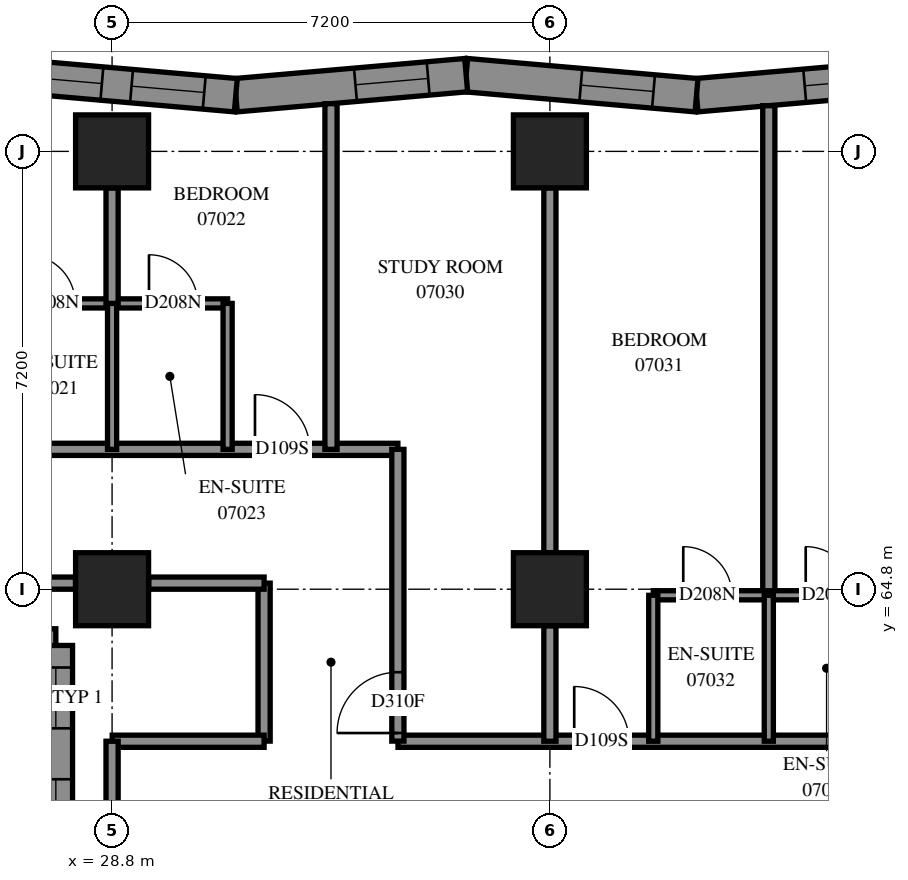
"""IFC4 building model, lengths in metres.
Left out: names, types, materials, properties, quantities, classifications, styles, units other than length and angle.
Written with IfcOpenShell. Run it as: python <this file> out.ifc"""

import sys

from ifc_helpers import new_model, si_unit, direction, frame, frame_2d, origin, origin_2d, place, context, subcontext, project, spatial, polyline, rectangle, outline, extrude, element, fill, save


model = new_model("IFC4")
c1 = context("Model", 3, precision=1e-05, world=origin(), true_north=direction((0.0, 1.0)))
c2 = subcontext(c1, "Body", "Model", "MODEL_VIEW")
j1 = project(units=[si_unit("LENGTHUNIT", "METRE"), si_unit("PLANEANGLEUNIT", "RADIAN")], contexts=[c1])
p1 = place(None, origin())
s1 = spatial("IfcSite", under=j1, at=p1, CompositionType="ELEMENT")
p2 = place(p1, origin())
s2 = spatial("IfcBuilding", under=s1, at=p2, CompositionType="ELEMENT")
p3 = place(p2, frame((0.0, 0.0, 30.4)))
s3 = spatial("IfcBuildingStorey", under=s2, at=p3, CompositionType="ELEMENT", Elevation=30.4)
for number, where, z_axis, x_axis in (
    (1, (28.8, 64.8, 0.0), (0.0, 0.0, 1.0), (1.0, 0.0, 0.0)),
    (2, (28.8, 72.0, 0.0), (0.0, 0.0, 1.0), (1.0, 0.0, 0.0)),
    (3, (36.0, 64.8, 0.0), (0.0, 0.0, 1.0), (1.0, 0.0, 0.0)),
    (4, (36.0, 72.0, 0.0), (0.0, 0.0, 1.0), (1.0, 0.0, 0.0)),
):
    element("IfcColumn", number, at=place(p3, frame(where, z_axis=z_axis, x_axis=x_axis)), inside=s3, PredefinedType="COLUMN", context=c2, shape_type="SweptSolid", body=[
        extrude(rectangle(XDim=1.2, YDim=1.2, at=origin_2d()), origin(), (0.0, 0.0, 1.0), 3.1),
    ])
p4 = place(p3, frame((42.2, 73.254, 0.0), z_axis=(0.0, 0.0, 1.0), x_axis=(-0.9962273538, -0.0867816769, 0.0)))
e5 = element("IfcWall", 5, at=p4, inside=s3, PredefinedType="SOLIDWALL", context=c2, shape_type="SweptSolid", body=[
    extrude(outline(polyline([(-0.024, -0.275), (3.779, -0.275), (3.827, 0.275), (0.024, 0.275), (-0.024, -0.275)])), origin(), (0.0, 0.0, 1.0), 3.1),
])
p5 = place(p4, frame((0.817, 0.0, 0.5)))
e6 = element("IfcOpeningElement", 6, at=p5, cuts=e5, PredefinedType="OPENING", context=c2, shape_type="SweptSolid", body=[
    extrude(rectangle(XDim=1.2, YDim=2.45, at=frame_2d((0.6, 1.225))), frame((0.0, 0.285, 0.0), z_axis=(0.0, -1.0, 0.0), x_axis=(1.0, 0.0, 0.0)), (0.0, 0.0, 1.0), 0.57),
])
p6 = place(p3, frame((38.411, 72.924, 0.0), z_axis=(0.0, 0.0, 1.0), x_axis=(-0.9962271558, 0.0867839505, 0.0)))
e7 = element("IfcWall", 7, at=p6, inside=s3, PredefinedType="SOLIDWALL", context=c2, shape_type="SweptSolid", body=[
    extrude(outline(polyline([(0.024, -0.275), (3.827, -0.275), (3.779, 0.275), (-0.024, 0.275), (0.024, -0.275)])), origin(), (0.0, 0.0, 1.0), 3.1),
])
p7 = place(p6, frame((0.71, 0.0, 0.5)))
e8 = element("IfcOpeningElement", 8, at=p7, cuts=e7, PredefinedType="OPENING", context=c2, shape_type="SweptSolid", body=[
    extrude(rectangle(XDim=1.2, YDim=2.45, at=frame_2d((0.6, 1.225))), frame((0.0, 0.285, 0.0), z_axis=(0.0, -1.0, 0.0), x_axis=(1.0, 0.0, 0.0)), (0.0, 0.0, 1.0), 0.57),
])
p8 = place(p3, frame((34.623, 73.254, 0.0), z_axis=(0.0, 0.0, 1.0), x_axis=(-0.9962273538, -0.0867816769, 0.0)))
e9 = element("IfcWall", 9, at=p8, inside=s3, PredefinedType="SOLIDWALL", context=c2, shape_type="SweptSolid", body=[
    extrude(outline(polyline([(-0.024, -0.275), (3.779, -0.275), (3.827, 0.275), (0.024, 0.275), (-0.024, -0.275)])), origin(), (0.0, 0.0, 1.0), 3.1),
])
p9 = place(p8, frame((0.628, 0.0, 0.5)))
e10 = element("IfcOpeningElement", 10, at=p9, cuts=e9, PredefinedType="OPENING", context=c2, shape_type="SweptSolid", body=[
    extrude(rectangle(XDim=1.2, YDim=2.45, at=frame_2d((0.6, 1.225))), frame((0.0, 0.285, 0.0), z_axis=(0.0, -1.0, 0.0), x_axis=(1.0, 0.0, 0.0)), (0.0, 0.0, 1.0), 0.57),
])
p10 = place(p3, frame((30.835, 72.924, 0.0), z_axis=(0.0, 0.0, 1.0), x_axis=(-0.9962273538, 0.0867816769, 0.0)))
e11 = element("IfcWall", 11, at=p10, inside=s3, PredefinedType="SOLIDWALL", context=c2, shape_type="SweptSolid", body=[
    extrude(outline(polyline([(0.024, -0.275), (3.827, -0.275), (3.779, 0.275), (-0.024, 0.275), (0.024, -0.275)])), origin(), (0.0, 0.0, 1.0), 3.1),
])
p11 = place(p10, frame((0.521, 0.0, 0.5)))
e12 = element("IfcOpeningElement", 12, at=p11, cuts=e11, PredefinedType="OPENING", context=c2, shape_type="SweptSolid", body=[
    extrude(rectangle(XDim=1.2, YDim=2.45, at=frame_2d((0.6, 1.225))), frame((0.0, 0.285, 0.0), z_axis=(0.0, -1.0, 0.0), x_axis=(1.0, 0.0, 0.0)), (0.0, 0.0, 1.0), 0.57),
])
p12 = place(p10, frame((2.211, 0.0, 0.5)))
e13 = element("IfcOpeningElement", 13, at=p12, cuts=e11, PredefinedType="OPENING", context=c2, shape_type="SweptSolid", body=[
    extrude(rectangle(XDim=1.2, YDim=2.45, at=frame_2d((0.6, 1.225))), frame((0.0, 0.285, 0.0), z_axis=(0.0, -1.0, 0.0), x_axis=(1.0, 0.0, 0.0)), (0.0, 0.0, 1.0), 0.57),
])
p13 = place(p3, frame((19.745, 63.875, 0.0), z_axis=(0.0, 0.0, 1.0), x_axis=(1.0, 0.0, 0.0)))
e14 = element("IfcWall", 14, at=p13, inside=s3, PredefinedType="SOLIDWALL", context=c2, shape_type="SweptSolid", body=[
    extrude(outline(polyline([(-0.275, -0.275), (7.855, -0.275), (8.405, 0.275), (0.275, 0.275), (-0.275, -0.275)])), origin(), (0.0, 0.0, 1.0), 3.1),
])
p14 = place(p13, frame((2.255, 0.0, 0.5)))
e15 = element("IfcOpeningElement", 15, at=p14, cuts=e14, PredefinedType="OPENING", context=c2, shape_type="SweptSolid", body=[
    extrude(rectangle(XDim=2.8, YDim=2.45, at=frame_2d((1.4, 1.225))), frame((0.0, 0.285, 0.0), z_axis=(0.0, -1.0, 0.0), x_axis=(1.0, 0.0, 0.0)), (0.0, 0.0, 1.0), 0.57),
])
p15 = place(p13, frame((6.093, 0.0, 0.5)))
e16 = element("IfcOpeningElement", 16, at=p15, cuts=e14, PredefinedType="OPENING", context=c2, shape_type="SweptSolid", body=[
    extrude(rectangle(XDim=1.2, YDim=2.45, at=frame_2d((0.6, 1.225))), frame((0.0, 0.285, 0.0), z_axis=(0.0, -1.0, 0.0), x_axis=(1.0, 0.0, 0.0)), (0.0, 0.0, 1.0), 0.57),
])
p16 = place(p3, frame((27.875, 63.875, 0.0), z_axis=(0.0, 0.0, 1.0), x_axis=(0.0, -1.0, 0.0)))
e17 = element("IfcWall", 17, at=p16, inside=s3, PredefinedType="SOLIDWALL", context=c2, shape_type="SweptSolid", body=[
    extrude(outline(polyline([(0.275, -0.275), (7.475, -0.275), (6.925, 0.275), (-0.275, 0.275), (0.275, -0.275)])), origin(), (0.0, 0.0, 1.0), 3.1),
])
p17 = place(p16, frame((3.975, 0.0, 0.7)))
e18 = element("IfcOpeningElement", 18, at=p17, cuts=e17, PredefinedType="OPENING", context=c2, shape_type="SweptSolid", body=[
    extrude(rectangle(XDim=1.8, YDim=2.2, at=frame_2d((0.9, 1.1))), frame((0.0, 0.285, 0.0), z_axis=(0.0, -1.0, 0.0), x_axis=(1.0, 0.0, 0.0)), (0.0, 0.0, 1.0), 0.57),
])
p18 = place(p16, frame((0.362, 0.0, 0.45)))
e19 = element("IfcOpeningElement", 19, at=p18, cuts=e17, PredefinedType="OPENING", context=c2, shape_type="SweptSolid", body=[
    extrude(rectangle(XDim=1.0, YDim=2.5, at=frame_2d((0.5, 1.25))), frame((0.0, 0.285, 0.0), z_axis=(0.0, -1.0, 0.0), x_axis=(1.0, 0.0, 0.0)), (0.0, 0.0, 1.0), 0.57),
])
p19 = place(p16, frame((2.2, 0.0, 0.5)))
e20 = element("IfcOpeningElement", 20, at=p19, cuts=e17, PredefinedType="OPENING", context=c2, shape_type="SweptSolid", body=[
    extrude(rectangle(XDim=1.2, YDim=2.45, at=frame_2d((0.6, 1.225))), frame((0.0, 0.285, 0.0), z_axis=(0.0, -1.0, 0.0), x_axis=(1.0, 0.0, 0.0)), (0.0, 0.0, 1.0), 0.57),
])
p20 = place(p3, frame((33.502, 62.3, 0.0), z_axis=(0.0, 0.0, 1.0), x_axis=(1.0, 0.0, 0.0)))
e21 = element("IfcWall", 21, at=p20, inside=s3, PredefinedType="PARTITIONING", context=c2, shape_type="SweptSolid", body=[
    extrude(rectangle(XDim=20.998, YDim=0.2, at=frame_2d((10.499, 0.0))), origin(), (0.0, 0.0, 1.0), 3.1),
])
p21 = place(p20, frame((2.898, 0.0, 0.0)))
e22 = element("IfcOpeningElement", 22, at=p21, cuts=e21, PredefinedType="OPENING", context=c2, shape_type="SweptSolid", body=[
    extrude(rectangle(XDim=0.9, YDim=2.1, at=frame_2d((0.45, 1.05))), frame((0.0, 0.11, 0.0), z_axis=(0.0, -1.0, 0.0), x_axis=(1.0, 0.0, 0.0)), (0.0, 0.0, 1.0), 0.22),
])
p22 = place(p20, frame((8.448, 0.0, 0.0)))
e23 = element("IfcOpeningElement", 23, at=p22, cuts=e21, PredefinedType="OPENING", context=c2, shape_type="SweptSolid", body=[
    extrude(rectangle(XDim=0.9, YDim=2.1, at=frame_2d((0.45, 1.05))), frame((0.0, 0.11, 0.0), z_axis=(0.0, -1.0, 0.0), x_axis=(1.0, 0.0, 0.0)), (0.0, 0.0, 1.0), 0.22),
])
p23 = place(p20, frame((10.098, 0.0, 0.0)))
e24 = element("IfcOpeningElement", 24, at=p23, cuts=e21, PredefinedType="OPENING", context=c2, shape_type="SweptSolid", body=[
    extrude(rectangle(XDim=0.9, YDim=2.1, at=frame_2d((0.45, 1.05))), frame((0.0, 0.11, 0.0), z_axis=(0.0, -1.0, 0.0), x_axis=(1.0, 0.0, 0.0)), (0.0, 0.0, 1.0), 0.22),
])
p24 = place(p20, frame((15.648, 0.0, 0.0)))
e25 = element("IfcOpeningElement", 25, at=p24, cuts=e21, PredefinedType="OPENING", context=c2, shape_type="SweptSolid", body=[
    extrude(rectangle(XDim=0.9, YDim=2.1, at=frame_2d((0.45, 1.05))), frame((0.0, 0.11, 0.0), z_axis=(0.0, -1.0, 0.0), x_axis=(1.0, 0.0, 0.0)), (0.0, 0.0, 1.0), 0.22),
])
p25 = place(p20, frame((17.298, 0.0, 0.0)))
e26 = element("IfcOpeningElement", 26, at=p25, cuts=e21, PredefinedType="OPENING", context=c2, shape_type="SweptSolid", body=[
    extrude(rectangle(XDim=0.9, YDim=2.1, at=frame_2d((0.45, 1.05))), frame((0.0, 0.11, 0.0), z_axis=(0.0, -1.0, 0.0), x_axis=(1.0, 0.0, 0.0)), (0.0, 0.0, 1.0), 0.22),
])
p26 = place(p3, frame((21.602, 67.1, 0.0), z_axis=(0.0, 0.0, 1.0), x_axis=(1.0, 0.0, 0.0)))
e27 = element("IfcWall", 27, at=p26, inside=s3, PredefinedType="PARTITIONING", context=c2, shape_type="SweptSolid", body=[
    extrude(rectangle(XDim=11.898, YDim=0.2, at=frame_2d((5.949, 0.0))), origin(), (0.0, 0.0, 1.0), 3.1),
])
p27 = place(p26, frame((1.798, 0.0, 0.0)))
e28 = element("IfcOpeningElement", 28, at=p27, cuts=e27, PredefinedType="OPENING", context=c2, shape_type="SweptSolid", body=[
    extrude(rectangle(XDim=1.0, YDim=2.1, at=frame_2d((0.5, 1.05))), frame((0.0, 0.11, 0.0), z_axis=(0.0, -1.0, 0.0), x_axis=(1.0, 0.0, 0.0)), (0.0, 0.0, 1.0), 0.22),
])
p28 = place(p26, frame((3.998, 0.0, 0.0)))
e29 = element("IfcOpeningElement", 29, at=p28, cuts=e27, PredefinedType="OPENING", context=c2, shape_type="SweptSolid", body=[
    extrude(rectangle(XDim=0.9, YDim=2.1, at=frame_2d((0.45, 1.05))), frame((0.0, 0.11, 0.0), z_axis=(0.0, -1.0, 0.0), x_axis=(1.0, 0.0, 0.0)), (0.0, 0.0, 1.0), 0.22),
])
p29 = place(p26, frame((9.548, 0.0, 0.0)))
e30 = element("IfcOpeningElement", 30, at=p29, cuts=e27, PredefinedType="OPENING", context=c2, shape_type="SweptSolid", body=[
    extrude(rectangle(XDim=0.9, YDim=2.1, at=frame_2d((0.45, 1.05))), frame((0.0, 0.11, 0.0), z_axis=(0.0, -1.0, 0.0), x_axis=(1.0, 0.0, 0.0)), (0.0, 0.0, 1.0), 0.22),
])
p30 = place(p3, frame((39.6, 64.7, 0.0), z_axis=(0.0, 0.0, 1.0), x_axis=(0.0, 1.0, 0.0)))
e31 = element("IfcWall", 31, at=p30, inside=s3, PredefinedType="PARTITIONING", context=c2, shape_type="SweptSolid", body=[
    extrude(rectangle(XDim=8.052, YDim=0.2, at=frame_2d((4.026, 0.0))), origin(), (0.0, 0.0, 1.0), 3.1),
])
p31 = place(p3, frame((22.2, 64.9, 0.0), z_axis=(0.0, 0.0, 1.0), x_axis=(1.0, 0.0, 0.0)))
e32 = element("IfcWall", 32, at=p31, inside=s3, PredefinedType="PARTITIONING", context=c2, shape_type="SweptSolid", body=[
    extrude(rectangle(XDim=6.0, YDim=0.2, at=frame_2d((3.0, 0.0))), origin(), (0.0, 0.0, 1.0), 2.6),
])
p32 = place(p3, frame((36.0, 65.4, 0.0), z_axis=(0.0, 0.0, 1.0), x_axis=(0.0, 1.0, 0.0)))
e33 = element("IfcWall", 33, at=p32, inside=s3, PredefinedType="PARTITIONING", context=c2, shape_type="SweptSolid", body=[
    extrude(rectangle(XDim=6.0, YDim=0.2, at=frame_2d((3.0, 0.0))), origin(), (0.0, 0.0, 1.0), 3.1),
])
p33 = place(p3, frame((32.4, 67.1, 0.0), z_axis=(0.0, 0.0, 1.0), x_axis=(0.0, 1.0, 0.0)))
e34 = element("IfcWall", 34, at=p33, inside=s3, PredefinedType="PARTITIONING", context=c2, shape_type="SweptSolid", body=[
    extrude(rectangle(XDim=5.684, YDim=0.2, at=frame_2d((2.842, 0.0))), origin(), (0.0, 0.0, 1.0), 3.1),
])
p34 = place(p3, frame((33.5, 62.302, 0.0), z_axis=(0.0, 0.0, 1.0), x_axis=(0.0, 1.0, 0.0)))
e35 = element("IfcWall", 35, at=p34, inside=s3, PredefinedType="PARTITIONING", context=c2, shape_type="SweptSolid", body=[
    extrude(rectangle(XDim=4.798, YDim=0.2, at=frame_2d((2.399, 0.0))), origin(), (0.0, 0.0, 1.0), 3.1),
])
p35 = place(p34, frame((0.133, 0.0, 0.0)))
e36 = element("IfcOpeningElement", 36, at=p35, cuts=e35, PredefinedType="OPENING", context=c2, shape_type="SweptSolid", body=[
    extrude(rectangle(XDim=1.0, YDim=2.1, at=frame_2d((0.5, 1.05))), frame((0.0, 0.11, 0.0), z_axis=(0.0, -1.0, 0.0), x_axis=(1.0, 0.0, 0.0)), (0.0, 0.0, 1.0), 0.22),
])
p36 = place(p3, frame((26.9, 69.5, 0.0), z_axis=(0.0, 0.0, 1.0), x_axis=(1.0, 0.0, 0.0)))
e37 = element("IfcWall", 37, at=p36, inside=s3, PredefinedType="PARTITIONING", context=c2, shape_type="SweptSolid", body=[
    extrude(rectangle(XDim=3.8, YDim=0.15, at=frame_2d((1.9, 0.0))), origin(), (0.0, 0.0, 1.0), 3.1),
])
p37 = place(p36, frame((0.493, 0.0, 0.0)))
e38 = element("IfcOpeningElement", 38, at=p37, cuts=e37, PredefinedType="OPENING", context=c2, shape_type="SweptSolid", body=[
    extrude(rectangle(XDim=0.8, YDim=2.1, at=frame_2d((0.4, 1.05))), frame((0.0, 0.085, 0.0), z_axis=(0.0, -1.0, 0.0), x_axis=(1.0, 0.0, 0.0)), (0.0, 0.0, 1.0), 0.17),
])
p38 = place(p36, frame((2.507, 0.0, 0.0)))
e39 = element("IfcOpeningElement", 39, at=p38, cuts=e37, PredefinedType="OPENING", context=c2, shape_type="SweptSolid", body=[
    extrude(rectangle(XDim=0.8, YDim=2.1, at=frame_2d((0.4, 1.05))), frame((0.0, 0.085, 0.0), z_axis=(0.0, -1.0, 0.0), x_axis=(1.0, 0.0, 0.0)), (0.0, 0.0, 1.0), 0.17),
])
p39 = place(p3, frame((37.7, 64.7, 0.0), z_axis=(0.0, 0.0, 1.0), x_axis=(1.0, 0.0, 0.0)))
e40 = element("IfcWall", 40, at=p39, inside=s3, PredefinedType="PARTITIONING", context=c2, shape_type="SweptSolid", body=[
    extrude(rectangle(XDim=3.8, YDim=0.15, at=frame_2d((1.9, 0.0))), origin(), (0.0, 0.0, 1.0), 3.1),
])
p40 = place(p39, frame((0.493, 0.0, 0.0)))
e41 = element("IfcOpeningElement", 41, at=p40, cuts=e40, PredefinedType="OPENING", context=c2, shape_type="SweptSolid", body=[
    extrude(rectangle(XDim=0.8, YDim=2.1, at=frame_2d((0.4, 1.05))), frame((0.0, 0.085, 0.0), z_axis=(0.0, -1.0, 0.0), x_axis=(1.0, 0.0, 0.0)), (0.0, 0.0, 1.0), 0.17),
])
p41 = place(p39, frame((2.507, 0.0, 0.0)))
e42 = element("IfcOpeningElement", 42, at=p41, cuts=e40, PredefinedType="OPENING", context=c2, shape_type="SweptSolid", body=[
    extrude(rectangle(XDim=0.8, YDim=2.1, at=frame_2d((0.4, 1.05))), frame((0.0, 0.085, 0.0), z_axis=(0.0, -1.0, 0.0), x_axis=(1.0, 0.0, 0.0)), (0.0, 0.0, 1.0), 0.17),
])
p42 = place(p3, frame((31.3, 62.302, 0.0), z_axis=(0.0, 0.0, 1.0), x_axis=(0.0, 1.0, 0.0)))
e43 = element("IfcWall", 43, at=p42, inside=s3, PredefinedType="PARTITIONING", context=c2, shape_type="SweptSolid", body=[
    extrude(rectangle(XDim=2.598, YDim=0.2, at=frame_2d((1.299, 0.0))), origin(), (0.0, 0.0, 1.0), 3.1),
])
p43 = place(p3, frame((28.802, 62.3, 0.0), z_axis=(0.0, 0.0, 1.0), x_axis=(1.0, 0.0, 0.0)))
e44 = element("IfcWall", 44, at=p43, inside=s3, PredefinedType="PARTITIONING", context=c2, shape_type="SweptSolid", body=[
    extrude(rectangle(XDim=2.498, YDim=0.2, at=frame_2d((1.249, 0.0))), origin(), (0.0, 0.0, 1.0), 3.1),
])
for number, where, z_axis, x_axis in (
    (45, (28.8, 67.1, 0.0), (0.0, 0.0, 1.0), (0.0, 1.0, 0.0)),
    (46, (30.7, 67.1, 0.0), (0.0, 0.0, 1.0), (0.0, 1.0, 0.0)),
    (47, (37.7, 62.3, 0.0), (0.0, 0.0, 1.0), (0.0, 1.0, 0.0)),
    (48, (39.6, 62.3, 0.0), (0.0, 0.0, 1.0), (0.0, 1.0, 0.0)),
):
    element("IfcWall", number, at=place(p3, frame(where, z_axis=z_axis, x_axis=x_axis)), inside=s3, PredefinedType="PARTITIONING", context=c2, shape_type="SweptSolid", body=[
        extrude(rectangle(XDim=2.4, YDim=0.15, at=frame_2d((1.2, 0.0))), origin(), (0.0, 0.0, 1.0), 3.1),
    ])
p44 = place(p3, frame((28.8, 60.1, 0.0), z_axis=(0.0, 0.0, 1.0), x_axis=(0.0, 1.0, 0.0)))
e49 = element("IfcWall", 49, at=p44, inside=s3, PredefinedType="PARTITIONING", context=c2, shape_type="SweptSolid", body=[
    extrude(rectangle(XDim=2.2, YDim=0.2, at=frame_2d((1.1, 0.0))), origin(), (0.0, 0.0, 1.0), 2.6),
])
for number, where, z_axis, x_axis in (
    (50, (28.8, 69.5, 0.0), (0.0, 0.0, 1.0), (0.0, 1.0, 0.0)),
    (51, (36.0, 62.3, 0.0), (0.0, 0.0, 1.0), (0.0, 1.0, 0.0)),
    (52, (29.4, 64.9, 0.0), (0.0, 0.0, 1.0), (1.0, 0.0, 0.0)),
):
    element("IfcWall", number, at=place(p3, frame(where, z_axis=z_axis, x_axis=x_axis)), inside=s3, PredefinedType="PARTITIONING", context=c2, shape_type="SweptSolid", body=[
        extrude(rectangle(XDim=1.9, YDim=0.2, at=frame_2d((0.95, 0.0))), origin(), (0.0, 0.0, 1.0), 3.1),
    ])
p45 = place(p3, frame((28.2, 64.9, 0.0), z_axis=(0.0, 0.0, 1.0), x_axis=(1.0, 0.0, 0.0)))
e53 = element("IfcWall", 53, at=p45, inside=s3, PredefinedType="PARTITIONING", context=c2, shape_type="SweptSolid", body=[
    extrude(rectangle(XDim=1.2, YDim=0.2, at=frame_2d((0.6, 0.0))), origin(), (0.0, 0.0, 1.0), 3.1),
])
p46 = place(p5, origin())
e54 = element("IfcWindow", 54, at=p46, inside=s3, PartitioningType="SINGLE_PANEL", PredefinedType="WINDOW", context=c2, shape_type="SweptSolid", body=[
    extrude(rectangle(XDim=1.2, YDim=2.45, at=frame_2d((0.6, 1.225))), frame((0.0, 0.155, 0.0), z_axis=(0.0, -1.0, 0.0), x_axis=(1.0, 0.0, 0.0)), (0.0, 0.0, 1.0), 0.06),
])
fill(e6, e54)
p47 = place(p7, origin())
e55 = element("IfcWindow", 55, at=p47, inside=s3, PartitioningType="SINGLE_PANEL", PredefinedType="WINDOW", context=c2, shape_type="SweptSolid", body=[
    extrude(rectangle(XDim=1.2, YDim=2.45, at=frame_2d((0.6, 1.225))), frame((0.0, 0.155, 0.0), z_axis=(0.0, -1.0, 0.0), x_axis=(1.0, 0.0, 0.0)), (0.0, 0.0, 1.0), 0.06),
])
fill(e8, e55)
p48 = place(p9, origin())
e56 = element("IfcWindow", 56, at=p48, inside=s3, PartitioningType="SINGLE_PANEL", PredefinedType="WINDOW", context=c2, shape_type="SweptSolid", body=[
    extrude(rectangle(XDim=1.2, YDim=2.45, at=frame_2d((0.6, 1.225))), frame((0.0, 0.155, 0.0), z_axis=(0.0, -1.0, 0.0), x_axis=(1.0, 0.0, 0.0)), (0.0, 0.0, 1.0), 0.06),
])
fill(e10, e56)
p49 = place(p11, origin())
e57 = element("IfcWindow", 57, at=p49, inside=s3, PartitioningType="SINGLE_PANEL", PredefinedType="WINDOW", context=c2, shape_type="SweptSolid", body=[
    extrude(rectangle(XDim=1.2, YDim=2.45, at=frame_2d((0.6, 1.225))), frame((0.0, 0.155, 0.0), z_axis=(0.0, -1.0, 0.0), x_axis=(1.0, 0.0, 0.0)), (0.0, 0.0, 1.0), 0.06),
])
fill(e12, e57)
p50 = place(p12, origin())
e58 = element("IfcWindow", 58, at=p50, inside=s3, PartitioningType="SINGLE_PANEL", PredefinedType="WINDOW", context=c2, shape_type="SweptSolid", body=[
    extrude(rectangle(XDim=1.2, YDim=2.45, at=frame_2d((0.6, 1.225))), frame((0.0, 0.155, 0.0), z_axis=(0.0, -1.0, 0.0), x_axis=(1.0, 0.0, 0.0)), (0.0, 0.0, 1.0), 0.06),
])
fill(e13, e58)
p51 = place(p37, origin())
e59 = element("IfcDoor", 59, at=p51, inside=s3, OperationType="SINGLE_SWING_RIGHT", PredefinedType="DOOR", context=c2, shape_type="SweptSolid", body=[
    extrude(rectangle(XDim=0.8, YDim=2.1, at=frame_2d((0.4, 1.05))), frame((0.0, 0.025, 0.0), z_axis=(0.0, -1.0, 0.0), x_axis=(1.0, 0.0, 0.0)), (0.0, 0.0, 1.0), 0.05),
])
fill(e38, e59)
p52 = place(p29, origin())
e60 = element("IfcDoor", 60, at=p52, inside=s3, OperationType="SINGLE_SWING_RIGHT", PredefinedType="DOOR", context=c2, shape_type="SweptSolid", body=[
    extrude(rectangle(XDim=0.9, YDim=2.1, at=frame_2d((0.45, 1.05))), frame((0.0, 0.025, 0.0), z_axis=(0.0, -1.0, 0.0), x_axis=(1.0, 0.0, 0.0)), (0.0, 0.0, 1.0), 0.05),
])
fill(e30, e60)
p53 = place(p38, origin())
e61 = element("IfcDoor", 61, at=p53, inside=s3, OperationType="SINGLE_SWING_RIGHT", PredefinedType="DOOR", context=c2, shape_type="SweptSolid", body=[
    extrude(rectangle(XDim=0.8, YDim=2.1, at=frame_2d((0.4, 1.05))), frame((0.0, 0.025, 0.0), z_axis=(0.0, -1.0, 0.0), x_axis=(1.0, 0.0, 0.0)), (0.0, 0.0, 1.0), 0.05),
])
fill(e39, e61)
p54 = place(p35, origin())
e62 = element("IfcDoor", 62, at=p54, inside=s3, OperationType="SINGLE_SWING_LEFT", PredefinedType="DOOR", context=c2, shape_type="SweptSolid", body=[
    extrude(rectangle(XDim=1.0, YDim=2.1, at=frame_2d((0.5, 1.05))), frame((0.0, 0.025, 0.0), z_axis=(0.0, -1.0, 0.0), x_axis=(1.0, 0.0, 0.0)), (0.0, 0.0, 1.0), 0.05),
])
fill(e36, e62)
p55 = place(p21, origin())
e63 = element("IfcDoor", 63, at=p55, inside=s3, OperationType="SINGLE_SWING_RIGHT", PredefinedType="DOOR", context=c2, shape_type="SweptSolid", body=[
    extrude(rectangle(XDim=0.9, YDim=2.1, at=frame_2d((0.45, 1.05))), frame((0.0, 0.025, 0.0), z_axis=(0.0, -1.0, 0.0), x_axis=(1.0, 0.0, 0.0)), (0.0, 0.0, 1.0), 0.05),
])
fill(e22, e63)
p56 = place(p40, origin())
e64 = element("IfcDoor", 64, at=p56, inside=s3, OperationType="SINGLE_SWING_RIGHT", PredefinedType="DOOR", context=c2, shape_type="SweptSolid", body=[
    extrude(rectangle(XDim=0.8, YDim=2.1, at=frame_2d((0.4, 1.05))), frame((0.0, 0.025, 0.0), z_axis=(0.0, -1.0, 0.0), x_axis=(1.0, 0.0, 0.0)), (0.0, 0.0, 1.0), 0.05),
])
fill(e41, e64)
p57 = place(p41, origin())
e65 = element("IfcDoor", 65, at=p57, inside=s3, OperationType="SINGLE_SWING_RIGHT", PredefinedType="DOOR", context=c2, shape_type="SweptSolid", body=[
    extrude(rectangle(XDim=0.8, YDim=2.1, at=frame_2d((0.4, 1.05))), frame((0.0, 0.025, 0.0), z_axis=(0.0, -1.0, 0.0), x_axis=(1.0, 0.0, 0.0)), (0.0, 0.0, 1.0), 0.05),
])
fill(e42, e65)
p58 = place(p18, origin())
e66 = element("IfcWindow", 66, at=p58, inside=s3, PartitioningType="SINGLE_PANEL", PredefinedType="WINDOW", context=c2, shape_type="SweptSolid", body=[
    extrude(rectangle(XDim=1.0, YDim=2.5, at=frame_2d((0.5, 1.25))), frame((0.0, 0.155, 0.0), z_axis=(0.0, -1.0, 0.0), x_axis=(1.0, 0.0, 0.0)), (0.0, 0.0, 1.0), 0.06),
])
fill(e19, e66)
p59 = place(p19, origin())
e67 = element("IfcWindow", 67, at=p59, inside=s3, PartitioningType="SINGLE_PANEL", PredefinedType="WINDOW", context=c2, shape_type="SweptSolid", body=[
    extrude(rectangle(XDim=1.2, YDim=2.45, at=frame_2d((0.6, 1.225))), frame((0.0, 0.155, 0.0), z_axis=(0.0, -1.0, 0.0), x_axis=(1.0, 0.0, 0.0)), (0.0, 0.0, 1.0), 0.06),
])
fill(e20, e67)
save(model, sys.argv[1])
